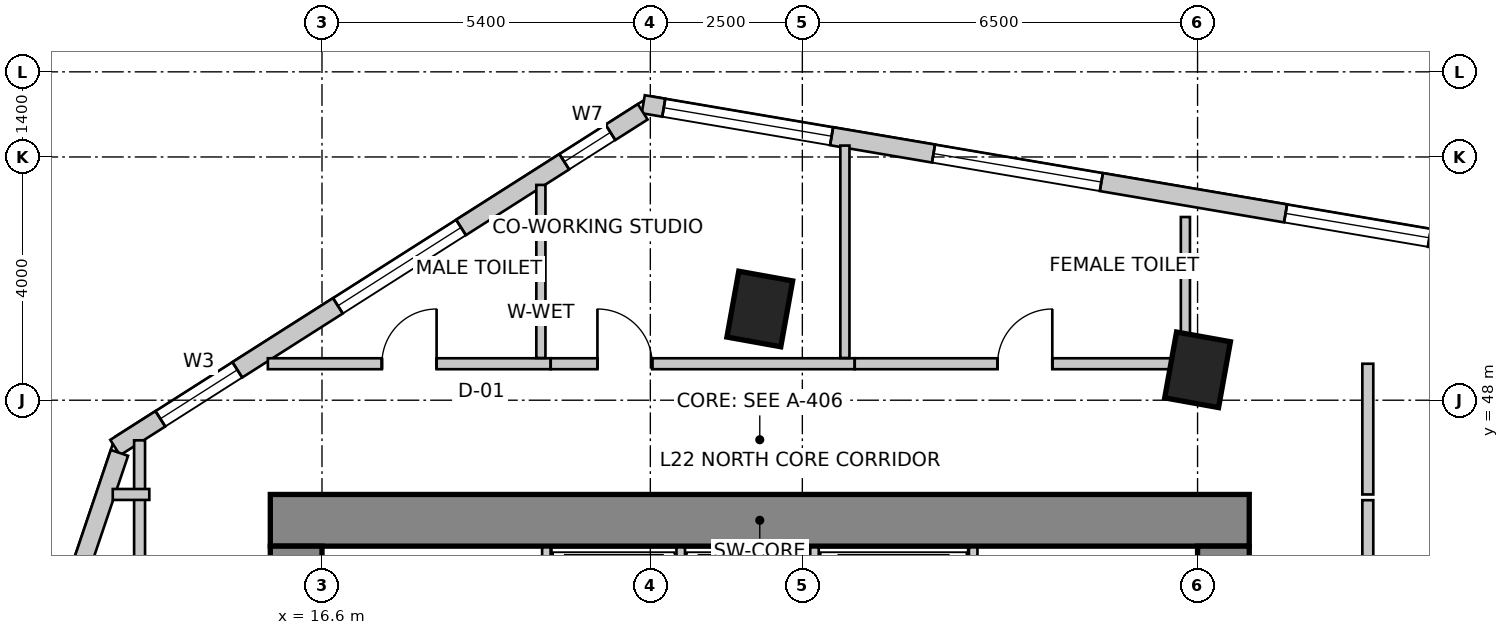
"""IFC4 building model, lengths in metres.
Left out: names, types, materials, properties, quantities, classifications, styles, units other than length and angle.
Written with IfcOpenShell. Run it as: python <this file> out.ifc"""

import sys

from ifc_helpers import new_model, si_unit, direction, frame, frame_2d, origin, origin_2d, place, context, subcontext, project, spatial, rectangle, extrude, source, transform, mapped, element, fill, save


model = new_model("IFC4")
c1 = context("Model", 3, precision=1e-05, world=origin(), true_north=direction((0.0, 1.0)))
c2 = subcontext(c1, "Body", "Model", "MODEL_VIEW")
j1 = project(units=[si_unit("LENGTHUNIT", "METRE"), si_unit("PLANEANGLEUNIT", "RADIAN")], contexts=[c1])
p1 = place(None, origin())
s1 = spatial("IfcSite", under=j1, at=p1, CompositionType="ELEMENT")
p2 = place(p1, origin())
s2 = spatial("IfcBuilding", under=s1, at=p2, CompositionType="ELEMENT")
p3 = place(p2, frame((0.0, 0.0, 91.0)))
s3 = spatial("IfcBuildingStorey", under=s2, at=p3, CompositionType="ELEMENT", Elevation=91.0)
p4 = place(p3, frame((15.75, 46.025, 0.0), z_axis=(0.0, 0.0, 1.0), x_axis=(1.0, 0.0, 0.0)))
e1 = element("IfcWall", 1, at=p4, inside=s3, PredefinedType="SHEAR", context=c2, shape_type="SweptSolid", body=[
    extrude(rectangle(XDim=16.1, YDim=0.85, at=frame_2d((8.05, 0.0))), origin(), (0.0, 0.0, 1.0), 4.0),
])
p5 = place(p3, frame((16.175, 34.2, 0.0), z_axis=(0.0, 0.0, 1.0), x_axis=(0.0, 1.0, 0.0)))
e2 = element("IfcWall", 2, at=p5, inside=s3, PredefinedType="SHEAR", context=c2, shape_type="SweptSolid", body=[
    extrude(rectangle(XDim=11.4, YDim=0.85, at=frame_2d((5.7, 0.0))), origin(), (0.0, 0.0, 1.0), 4.0),
])
m1 = source(origin(), c2, "Body", "SweptSolid", [
    extrude(rectangle(XDim=1.1, YDim=2.15, at=frame_2d((0.55, 1.075))), frame((0.0, 0.435, 0.0), z_axis=(0.0, -1.0, 0.0), x_axis=(1.0, 0.0, 0.0)), (0.0, 0.0, 1.0), 0.87),
])
p6 = place(p5, frame((7.15, 0.0, 0.0)))
e3 = element("IfcOpeningElement", 3, at=p6, cuts=e2, PredefinedType="OPENING", context=c2, shape_type="MappedRepresentation", body=[
    mapped(m1, transform((0.0, 0.0, 0.0), scale=1.0)),
])
p7 = place(p3, frame((31.425, 34.2, 0.0), z_axis=(0.0, 0.0, 1.0), x_axis=(0.0, 1.0, 0.0)))
e4 = element("IfcWall", 4, at=p7, inside=s3, PredefinedType="SHEAR", context=c2, shape_type="SweptSolid", body=[
    extrude(rectangle(XDim=11.4, YDim=0.85, at=frame_2d((5.7, 0.0))), origin(), (0.0, 0.0, 1.0), 4.0),
])
p8 = place(p7, frame((7.35, 0.0, 0.0)))
e5 = element("IfcOpeningElement", 5, at=p8, cuts=e4, PredefinedType="OPENING", context=c2, shape_type="MappedRepresentation", body=[
    mapped(m1, transform((0.0, 0.0, 0.0), scale=1.0)),
])
m2 = source(origin(), c2, "Body", "SweptSolid", [
    extrude(rectangle(XDim=0.9, YDim=1.1, at=origin_2d()), origin(), (0.0, 0.0, 1.0), 4.0),
])
for number, where, z_axis, x_axis in (
    (6, (23.8, 49.5, 0.0), (0.0, 0.0, 1.0), (0.984, -0.177, 0.0)),
    (7, (31.0, 48.5, 0.0), (0.0, 0.0, 1.0), (0.984, -0.177, 0.0)),
):
    element("IfcColumn", number, at=place(p3, frame(where, z_axis=z_axis, x_axis=x_axis)), inside=s3, PredefinedType="COLUMN", context=c2, shape_type="MappedRepresentation", body=[
        mapped(m2, transform((0.0, 0.0, 0.0), scale=1.0)),
    ])
p9 = place(p3, frame((53.961, 47.417, 0.0), z_axis=(0.0, 0.0, 1.0), x_axis=(-0.985865713455, 0.167537443678, 0.0)))
e8 = element("IfcWall", 8, at=p9, inside=s3, PredefinedType="SOLIDWALL", context=c2, shape_type="SweptSolid", body=[
    extrude(rectangle(XDim=32.537, YDim=0.3, at=frame_2d((16.269, 0.0))), origin(), (0.0, 0.0, 1.0), 3.75),
])
m3 = source(origin(), c2, "Body", "SweptSolid", [
    extrude(rectangle(XDim=2.4, YDim=2.2, at=frame_2d((1.2, 1.1))), frame((0.0, 0.16, 0.0), z_axis=(0.0, -1.0, 0.0), x_axis=(1.0, 0.0, 0.0)), (0.0, 0.0, 1.0), 0.32),
])
p10 = place(p9, frame((0.476, 0.0, 0.85)))
e9 = element("IfcOpeningElement", 9, at=p10, cuts=e8, PredefinedType="OPENING", context=c2, shape_type="MappedRepresentation", body=[
    mapped(m3, transform((0.0, 0.0, 0.0), scale=1.0)),
])
m4 = source(origin(), c2, "Body", "SweptSolid", [
    extrude(rectangle(XDim=2.8, YDim=2.4, at=frame_2d((1.4, 1.2))), frame((0.0, 0.16, 0.0), z_axis=(0.0, -1.0, 0.0), x_axis=(1.0, 0.0, 0.0)), (0.0, 0.0, 1.0), 0.32),
])
p11 = place(p9, frame((4.304, 0.0, 0.85)))
e10 = element("IfcOpeningElement", 10, at=p11, cuts=e8, PredefinedType="OPENING", context=c2, shape_type="MappedRepresentation", body=[
    mapped(m4, transform((0.0, 0.0, 0.0), scale=1.0)),
])
p12 = place(p9, frame((8.968, 0.0, 0.85)))
e11 = element("IfcOpeningElement", 11, at=p12, cuts=e8, PredefinedType="OPENING", context=c2, shape_type="MappedRepresentation", body=[
    mapped(m3, transform((0.0, 0.0, 0.0), scale=1.0)),
])
p13 = place(p9, frame((14.034, 0.0, 0.85)))
e12 = element("IfcOpeningElement", 12, at=p13, cuts=e8, PredefinedType="OPENING", context=c2, shape_type="MappedRepresentation", body=[
    mapped(m4, transform((0.0, 0.0, 0.0), scale=1.0)),
])
p14 = place(p9, frame((19.422, 0.0, 0.85)))
e13 = element("IfcOpeningElement", 13, at=p14, cuts=e8, PredefinedType="OPENING", context=c2, shape_type="MappedRepresentation", body=[
    mapped(m3, transform((0.0, 0.0, 0.0), scale=1.0)),
])
p15 = place(p9, frame((24.895, 0.0, 0.85)))
e14 = element("IfcOpeningElement", 14, at=p15, cuts=e8, PredefinedType="OPENING", context=c2, shape_type="MappedRepresentation", body=[
    mapped(m4, transform((0.0, 0.0, 0.0), scale=1.0)),
])
p16 = place(p9, frame((29.395, 0.0, 0.85)))
e15 = element("IfcOpeningElement", 15, at=p16, cuts=e8, PredefinedType="OPENING", context=c2, shape_type="MappedRepresentation", body=[
    mapped(m4, transform((0.0, 0.0, 0.0), scale=1.0)),
])
p17 = place(p3, frame((21.875, 52.742, 0.0), z_axis=(0.0, 0.0, 1.0), x_axis=(-0.843662465249, -0.536873956092, 0.0)))
e16 = element("IfcWall", 16, at=p17, inside=s3, PredefinedType="SOLIDWALL", context=c2, shape_type="SweptSolid", body=[
    extrude(rectangle(XDim=10.284, YDim=0.3, at=frame_2d((5.142, 0.0))), origin(), (0.0, 0.0, 1.0), 3.75),
])
m5 = source(origin(), c2, "Body", "SweptSolid", [
    extrude(rectangle(XDim=0.9, YDim=1.6, at=frame_2d((0.45, 0.8))), frame((0.0, 0.16, 0.0), z_axis=(0.0, -1.0, 0.0), x_axis=(1.0, 0.0, 0.0)), (0.0, 0.0, 1.0), 0.32),
])
p18 = place(p17, frame((0.629, 0.0, 0.85)))
e17 = element("IfcOpeningElement", 17, at=p18, cuts=e16, PredefinedType="OPENING", context=c2, shape_type="MappedRepresentation", body=[
    mapped(m5, transform((0.0, 0.0, 0.0), scale=1.0)),
])
p19 = place(p17, frame((3.542, 0.0, 0.85)))
e18 = element("IfcOpeningElement", 18, at=p19, cuts=e16, PredefinedType="OPENING", context=c2, shape_type="MappedRepresentation", body=[
    mapped(m3, transform((0.0, 0.0, 0.0), scale=1.0)),
])
m6 = source(origin(), c2, "Body", "SweptSolid", [
    extrude(rectangle(XDim=1.5, YDim=1.8, at=frame_2d((0.75, 0.9))), frame((0.0, 0.16, 0.0), z_axis=(0.0, -1.0, 0.0), x_axis=(1.0, 0.0, 0.0)), (0.0, 0.0, 1.0), 0.32),
])
p20 = place(p17, frame((7.903, 0.0, 0.85)))
e19 = element("IfcOpeningElement", 19, at=p20, cuts=e16, PredefinedType="OPENING", context=c2, shape_type="MappedRepresentation", body=[
    mapped(m6, transform((0.0, 0.0, 0.0), scale=1.0)),
])
p21 = place(p3, frame((13.269, 47.134, 0.0), z_axis=(0.0, 0.0, 1.0), x_axis=(-0.319920423265, -0.947444416722, 0.0)))
e20 = element("IfcWall", 20, at=p21, inside=s3, PredefinedType="SOLIDWALL", context=c2, shape_type="SweptSolid", body=[
    extrude(rectangle(XDim=16.135, YDim=0.3, at=frame_2d((8.067, 0.0))), origin(), (0.0, 0.0, 1.0), 3.75),
])
p22 = place(p21, frame((1.988, 0.0, 0.85)))
e21 = element("IfcOpeningElement", 21, at=p22, cuts=e20, PredefinedType="OPENING", context=c2, shape_type="MappedRepresentation", body=[
    mapped(m4, transform((0.0, 0.0, 0.0), scale=1.0)),
])
p23 = place(p21, frame((7.159, 0.0, 0.85)))
e22 = element("IfcOpeningElement", 22, at=p23, cuts=e20, PredefinedType="OPENING", context=c2, shape_type="MappedRepresentation", body=[
    mapped(m3, transform((0.0, 0.0, 0.0), scale=1.0)),
])
p24 = place(p21, frame((11.93, 0.0, 0.85)))
e23 = element("IfcOpeningElement", 23, at=p24, cuts=e20, PredefinedType="OPENING", context=c2, shape_type="MappedRepresentation", body=[
    mapped(m4, transform((0.0, 0.0, 0.0), scale=1.0)),
])
for number, where, z_axis, x_axis in (
    (24, (20.29, 43.28, 0.0), (0.0, 0.0, 1.0), (0.0, 1.0, 0.0)),
    (25, (27.31, 43.28, 0.0), (0.0, 0.0, 1.0), (0.0, 1.0, 0.0)),
):
    element("IfcWall", number, at=place(p3, frame(where, z_axis=z_axis, x_axis=x_axis)), inside=s3, PredefinedType="SOLIDWALL", context=c2, shape_type="SweptSolid", body=[
        extrude(rectangle(XDim=2.3, YDim=0.14, at=frame_2d((1.15, 0.0))), origin(), (0.0, 0.0, 1.0), 3.75),
    ])
for number, where, z_axis, x_axis in (
    (26, (22.5, 43.02, 0.0), (0.0, 0.0, 1.0), (0.0, 1.0, 0.0)),
    (27, (24.7, 43.02, 0.0), (0.0, 0.0, 1.0), (0.0, 1.0, 0.0)),
):
    element("IfcWall", number, at=place(p3, frame(where, z_axis=z_axis, x_axis=x_axis)), inside=s3, PredefinedType="SOLIDWALL", context=c2, shape_type="SweptSolid", body=[
        extrude(rectangle(XDim=2.56, YDim=0.14, at=frame_2d((1.28, 0.0))), origin(), (0.0, 0.0, 1.0), 3.75),
    ])
p25 = place(p3, frame((13.6, 33.444, 0.0), z_axis=(0.0, 0.0, 1.0), x_axis=(0.0, 1.0, 0.0)))
e28 = element("IfcWall", 28, at=p25, inside=s3, PredefinedType="PARTITIONING", context=c2, shape_type="SweptSolid", body=[
    extrude(rectangle(XDim=13.896, YDim=0.18, at=frame_2d((6.948, 0.0))), origin(), (0.0, 0.0, 1.0), 2.892),
])
m7 = source(origin(), c2, "Body", "SweptSolid", [
    extrude(rectangle(XDim=0.9, YDim=2.15, at=frame_2d((0.45, 1.075))), frame((0.0, 0.1, 0.0), z_axis=(0.0, -1.0, 0.0), x_axis=(1.0, 0.0, 0.0)), (0.0, 0.0, 1.0), 0.2),
])
p26 = place(p25, frame((4.144, 0.0, 0.0)))
e29 = element("IfcOpeningElement", 29, at=p26, cuts=e28, PredefinedType="OPENING", context=c2, shape_type="MappedRepresentation", body=[
    mapped(m7, transform((0.0, 0.0, 0.0), scale=1.0)),
])
p27 = place(p3, frame((13.76, 46.45, 0.0), z_axis=(0.0, 0.0, 1.0), x_axis=(-1.0, 0.0, 0.0)))
e30 = element("IfcWall", 30, at=p27, inside=s3, PredefinedType="PARTITIONING", context=c2, shape_type="SweptSolid", body=[
    extrude(rectangle(XDim=0.601, YDim=0.18, at=frame_2d((0.301, 0.0))), origin(), (0.0, 0.0, 1.0), 3.75),
])
p28 = place(p3, frame((15.71, 48.6, 0.0), z_axis=(0.0, 0.0, 1.0), x_axis=(1.0, 0.0, 0.0)))
e31 = element("IfcWall", 31, at=p28, inside=s3, PredefinedType="PARTITIONING", context=c2, shape_type="SweptSolid", body=[
    extrude(rectangle(XDim=4.65, YDim=0.18, at=frame_2d((2.325, 0.0))), origin(), (0.0, 0.0, 1.0), 3.75),
])
p29 = place(p28, frame((1.875, 0.0, 0.0)))
e32 = element("IfcOpeningElement", 32, at=p29, cuts=e31, PredefinedType="OPENING", context=c2, shape_type="MappedRepresentation", body=[
    mapped(m7, transform((0.0, 0.0, 0.0), scale=1.0)),
])
p30 = place(p3, frame((20.362, 48.6, 0.0), z_axis=(0.0, 0.0, 1.0), x_axis=(1.0, 0.0, 0.0)))
e33 = element("IfcWall", 33, at=p30, inside=s3, PredefinedType="PARTITIONING", context=c2, shape_type="SweptSolid", body=[
    extrude(rectangle(XDim=4.998, YDim=0.18, at=frame_2d((2.499, 0.0))), origin(), (0.0, 0.0, 1.0), 3.419),
])
p31 = place(p30, frame((0.768, 0.0, 0.0)))
e34 = element("IfcOpeningElement", 34, at=p31, cuts=e33, PredefinedType="OPENING", context=c2, shape_type="MappedRepresentation", body=[
    mapped(m7, transform((0.0, 0.0, 0.0), scale=1.0)),
])
p32 = place(p3, frame((25.362, 48.6, 0.0), z_axis=(0.0, 0.0, 1.0), x_axis=(1.0, 0.0, 0.0)))
e35 = element("IfcWall", 35, at=p32, inside=s3, PredefinedType="PARTITIONING", context=c2, shape_type="SweptSolid", body=[
    extrude(rectangle(XDim=5.598, YDim=0.18, at=frame_2d((2.799, 0.0))), origin(), (0.0, 0.0, 1.0), 2.892),
])
p33 = place(p32, frame((2.349, 0.0, 0.0)))
e36 = element("IfcOpeningElement", 36, at=p33, cuts=e35, PredefinedType="OPENING", context=c2, shape_type="MappedRepresentation", body=[
    mapped(m7, transform((0.0, 0.0, 0.0), scale=1.0)),
])
p34 = place(p3, frame((33.8, 48.6, 0.0), z_axis=(0.0, 0.0, 1.0), x_axis=(0.0, -1.0, 0.0)))
e37 = element("IfcWall", 37, at=p34, inside=s3, PredefinedType="PARTITIONING", context=c2, shape_type="SweptSolid", body=[
    extrude(rectangle(XDim=2.15, YDim=0.18, at=frame_2d((1.075, 0.0))), origin(), (0.0, 0.0, 1.0), 2.892),
])
p35 = place(p3, frame((33.8, 46.356, 0.0), z_axis=(0.0, 0.0, 1.0), x_axis=(0.0, -1.0, 0.0)))
e38 = element("IfcWall", 38, at=p35, inside=s3, PredefinedType="PARTITIONING", context=c2, shape_type="SweptSolid", body=[
    extrude(rectangle(XDim=3.716, YDim=0.18, at=frame_2d((1.858, 0.0))), origin(), (0.0, 0.0, 1.0), 3.279),
])
p36 = place(p3, frame((20.2, 51.54, 0.0), z_axis=(0.0, 0.0, 1.0), x_axis=(0.0, -1.0, 0.0)))
e39 = element("IfcWall", 39, at=p36, inside=s3, PredefinedType="PARTITIONING", context=c2, shape_type="SweptSolid", body=[
    extrude(rectangle(XDim=2.846, YDim=0.15, at=frame_2d((1.423, 0.0))), origin(), (0.0, 0.0, 1.0), 3.75),
])
p37 = place(p3, frame((25.2, 52.188, 0.0), z_axis=(0.0, 0.0, 1.0), x_axis=(0.0, -1.0, 0.0)))
e40 = element("IfcWall", 40, at=p37, inside=s3, PredefinedType="PARTITIONING", context=c2, shape_type="SweptSolid", body=[
    extrude(rectangle(XDim=3.493, YDim=0.15, at=frame_2d((1.747, 0.0))), origin(), (0.0, 0.0, 1.0), 2.892),
])
p38 = place(p3, frame((30.8, 51.013, 0.0), z_axis=(0.0, 0.0, 1.0), x_axis=(0.0, -1.0, 0.0)))
e41 = element("IfcWall", 41, at=p38, inside=s3, PredefinedType="PARTITIONING", context=c2, shape_type="SweptSolid", body=[
    extrude(rectangle(XDim=2.193, YDim=0.15, at=frame_2d((1.096, 0.0))), origin(), (0.0, 0.0, 1.0), 3.75),
])
m8 = source(origin(), c2, "Body", "SweptSolid", [
    extrude(rectangle(XDim=2.4, YDim=2.2, at=frame_2d((1.2, 1.1))), frame((0.0, -0.015, 0.0), z_axis=(0.0, -1.0, 0.0), x_axis=(1.0, 0.0, 0.0)), (0.0, 0.0, 1.0), 0.06),
])
p39 = place(p14, origin())
e42 = element("IfcWindow", 42, at=p39, inside=s3, PartitioningType="SINGLE_PANEL", PredefinedType="WINDOW", context=c2, shape_type="MappedRepresentation", body=[
    mapped(m8, transform((0.0, 0.0, 0.0), scale=1.0)),
])
fill(e13, e42)
m9 = source(origin(), c2, "Body", "SweptSolid", [
    extrude(rectangle(XDim=2.8, YDim=2.4, at=frame_2d((1.4, 1.2))), frame((0.0, -0.015, 0.0), z_axis=(0.0, -1.0, 0.0), x_axis=(1.0, 0.0, 0.0)), (0.0, 0.0, 1.0), 0.06),
])
p40 = place(p15, origin())
e43 = element("IfcWindow", 43, at=p40, inside=s3, PartitioningType="SINGLE_PANEL", PredefinedType="WINDOW", context=c2, shape_type="MappedRepresentation", body=[
    mapped(m9, transform((0.0, 0.0, 0.0), scale=1.0)),
])
fill(e14, e43)
p41 = place(p16, origin())
e44 = element("IfcWindow", 44, at=p41, inside=s3, PartitioningType="SINGLE_PANEL", PredefinedType="WINDOW", context=c2, shape_type="MappedRepresentation", body=[
    mapped(m9, transform((0.0, 0.0, 0.0), scale=1.0)),
])
fill(e15, e44)
m10 = source(origin(), c2, "Body", "SweptSolid", [
    extrude(rectangle(XDim=0.9, YDim=1.6, at=frame_2d((0.45, 0.8))), frame((0.0, -0.015, 0.0), z_axis=(0.0, -1.0, 0.0), x_axis=(1.0, 0.0, 0.0)), (0.0, 0.0, 1.0), 0.06),
])
p42 = place(p18, origin())
e45 = element("IfcWindow", 45, at=p42, inside=s3, PartitioningType="SINGLE_PANEL", PredefinedType="WINDOW", context=c2, shape_type="MappedRepresentation", body=[
    mapped(m10, transform((0.0, 0.0, 0.0), scale=1.0)),
])
fill(e17, e45)
p43 = place(p19, origin())
e46 = element("IfcWindow", 46, at=p43, inside=s3, PartitioningType="SINGLE_PANEL", PredefinedType="WINDOW", context=c2, shape_type="MappedRepresentation", body=[
    mapped(m8, transform((0.0, 0.0, 0.0), scale=1.0)),
])
fill(e18, e46)
m11 = source(origin(), c2, "Body", "SweptSolid", [
    extrude(rectangle(XDim=1.5, YDim=1.8, at=frame_2d((0.75, 0.9))), frame((0.0, -0.015, 0.0), z_axis=(0.0, -1.0, 0.0), x_axis=(1.0, 0.0, 0.0)), (0.0, 0.0, 1.0), 0.06),
])
p44 = place(p20, origin())
e47 = element("IfcWindow", 47, at=p44, inside=s3, PartitioningType="SINGLE_PANEL", PredefinedType="WINDOW", context=c2, shape_type="MappedRepresentation", body=[
    mapped(m11, transform((0.0, 0.0, 0.0), scale=1.0)),
])
fill(e19, e47)
m12 = source(origin(), c2, "Body", "SweptSolid", [
    extrude(rectangle(XDim=0.9, YDim=2.15, at=frame_2d((0.45, 1.075))), frame((0.0, 0.025, 0.0), z_axis=(0.0, -1.0, 0.0), x_axis=(1.0, 0.0, 0.0)), (0.0, 0.0, 1.0), 0.05),
])
p45 = place(p29, origin())
e48 = element("IfcDoor", 48, at=p45, inside=s3, OperationType="SINGLE_SWING_RIGHT", PredefinedType="DOOR", context=c2, shape_type="MappedRepresentation", body=[
    mapped(m12, transform((0.0, 0.0, 0.0), scale=1.0)),
])
fill(e32, e48)
p46 = place(p31, origin())
e49 = element("IfcDoor", 49, at=p46, inside=s3, OperationType="SINGLE_SWING_LEFT", PredefinedType="DOOR", context=c2, shape_type="MappedRepresentation", body=[
    mapped(m12, transform((0.0, 0.0, 0.0), scale=1.0)),
])
fill(e34, e49)
p47 = place(p33, origin())
e50 = element("IfcDoor", 50, at=p47, inside=s3, OperationType="SINGLE_SWING_RIGHT", PredefinedType="DOOR", context=c2, shape_type="MappedRepresentation", body=[
    mapped(m12, transform((0.0, 0.0, 0.0), scale=1.0)),
])
fill(e36, e50)
save(model, sys.argv[1])
